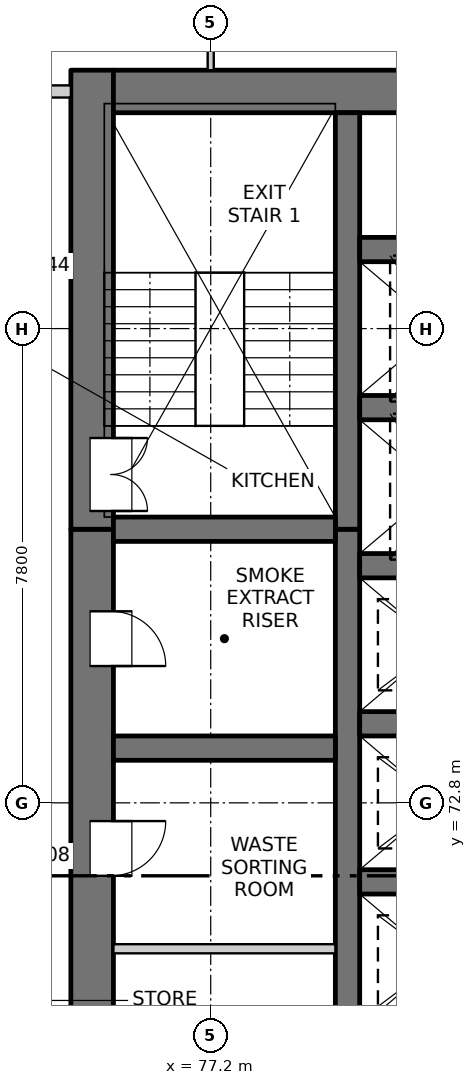
"""IFC4 building model, lengths in metres.
Left out: names, types, materials, properties, quantities, classifications, styles, units other than length and angle.
Written with IfcOpenShell. Run it as: python <this file> out.ifc"""

import sys

from ifc_helpers import new_model, si_unit, direction, frame, frame_2d, origin, place, context, subcontext, project, spatial, rectangle, extrude, element, fill, save


model = new_model("IFC4")
c1 = context("Model", 3, precision=1e-05, world=origin(), true_north=direction((0.0, 1.0)))
c2 = subcontext(c1, "Body", "Model", "MODEL_VIEW")
j1 = project(units=[si_unit("LENGTHUNIT", "METRE"), si_unit("PLANEANGLEUNIT", "RADIAN")], contexts=[c1])
p1 = place(None, origin())
s1 = spatial("IfcSite", under=j1, at=p1, CompositionType="ELEMENT")
p2 = place(p1, origin())
s2 = spatial("IfcBuilding", under=s1, at=p2, CompositionType="ELEMENT")
p3 = place(p2, frame((0.0, 0.0, 39.9)))
s3 = spatial("IfcBuildingStorey", under=s2, at=p3, CompositionType="ELEMENT", Elevation=39.9)
p4 = place(p3, frame((75.25, 54.9, -0.25), z_axis=(0.0, 0.0, 1.0), x_axis=(0.0, 1.0, 0.0)))
e1 = element("IfcWall", 1, at=p4, inside=s3, PredefinedType="SOLIDWALL", context=c2, shape_type="SweptSolid", body=[
    extrude(rectangle(XDim=22.4, YDim=0.7, at=frame_2d((11.2, 0.0))), origin(), (0.0, 0.0, 1.0), 3.4),
])
p5 = place(p4, frame((7.55, 0.0, 0.25)))
e2 = element("IfcOpeningElement", 2, at=p5, cuts=e1, PredefinedType="OPENING", context=c2, shape_type="SweptSolid", body=[
    extrude(rectangle(XDim=0.9, YDim=2.1, at=frame_2d((0.45, 1.05))), frame((0.0, 0.36, 0.0), z_axis=(0.0, -1.0, 0.0), x_axis=(1.0, 0.0, 0.0)), (0.0, 0.0, 1.0), 0.72),
])
p6 = place(p4, frame((12.2, 0.0, 0.25)))
e3 = element("IfcOpeningElement", 3, at=p6, cuts=e1, PredefinedType="OPENING", context=c2, shape_type="SweptSolid", body=[
    extrude(rectangle(XDim=0.9, YDim=2.1, at=frame_2d((0.45, 1.05))), frame((0.0, 0.36, 0.0), z_axis=(0.0, -1.0, 0.0), x_axis=(1.0, 0.0, 0.0)), (0.0, 0.0, 1.0), 0.72),
])
p7 = place(p4, frame((16.7, 0.0, 0.25)))
e4 = element("IfcOpeningElement", 4, at=p7, cuts=e1, PredefinedType="OPENING", context=c2, shape_type="SweptSolid", body=[
    extrude(rectangle(XDim=0.9, YDim=2.1, at=frame_2d((0.45, 1.05))), frame((0.0, 0.36, 0.0), z_axis=(0.0, -1.0, 0.0), x_axis=(1.0, 0.0, 0.0)), (0.0, 0.0, 1.0), 0.72),
])
p8 = place(p4, frame((20.15, 0.0, 0.25)))
e5 = element("IfcOpeningElement", 5, at=p8, cuts=e1, PredefinedType="OPENING", context=c2, shape_type="SweptSolid", body=[
    extrude(rectangle(XDim=0.9, YDim=2.1, at=frame_2d((0.45, 1.05))), frame((0.0, 0.36, 0.0), z_axis=(0.0, -1.0, 0.0), x_axis=(1.0, 0.0, 0.0)), (0.0, 0.0, 1.0), 0.72),
])
p9 = place(p3, frame((75.25, 77.3, -0.25), z_axis=(0.0, 0.0, 1.0), x_axis=(0.0, 1.0, 0.0)))
e6 = element("IfcWall", 6, at=p9, inside=s3, PredefinedType="SOLIDWALL", context=c2, shape_type="SweptSolid", body=[
    extrude(rectangle(XDim=7.55, YDim=0.7, at=frame_2d((3.775, 0.0))), origin(), (0.0, 0.0, 1.0), 3.4),
])
p10 = place(p9, frame((0.3, 0.0, 0.25)))
e7 = element("IfcOpeningElement", 7, at=p10, cuts=e6, PredefinedType="OPENING", context=c2, shape_type="SweptSolid", body=[
    extrude(rectangle(XDim=1.2, YDim=2.1, at=frame_2d((0.6, 1.05))), frame((0.0, 0.36, 0.0), z_axis=(0.0, -1.0, 0.0), x_axis=(1.0, 0.0, 0.0)), (0.0, 0.0, 1.0), 0.72),
])
p11 = place(p3, frame((75.6, 84.5, -0.25), z_axis=(0.0, 0.0, 1.0), x_axis=(1.0, 0.0, 0.0)))
e8 = element("IfcWall", 8, at=p11, inside=s3, PredefinedType="SOLIDWALL", context=c2, shape_type="SweptSolid", body=[
    extrude(rectangle(XDim=18.8, YDim=0.7, at=frame_2d((9.4, 0.0))), origin(), (0.0, 0.0, 1.0), 3.4),
])
p12 = place(p3, frame((79.45, 60.9, -0.25), z_axis=(0.0, 0.0, 1.0), x_axis=(0.0, 1.0, 0.0)))
e9 = element("IfcWall", 9, at=p12, inside=s3, PredefinedType="SOLIDWALL", context=c2, shape_type="SweptSolid", body=[
    extrude(rectangle(XDim=16.4, YDim=0.4, at=frame_2d((8.2, 0.0))), origin(), (0.0, 0.0, 1.0), 3.4),
])
p13 = place(p3, frame((79.45, 77.3, -0.25), z_axis=(0.0, 0.0, 1.0), x_axis=(0.0, 1.0, 0.0)))
e10 = element("IfcWall", 10, at=p13, inside=s3, PredefinedType="SOLIDWALL", context=c2, shape_type="SweptSolid", body=[
    extrude(rectangle(XDim=6.85, YDim=0.4, at=frame_2d((3.425, 0.0))), origin(), (0.0, 0.0, 1.0), 3.4),
])
for number, where, z_axis, x_axis in (
    (11, (79.65, 71.5, -0.25), (0.0, 0.0, 1.0), (1.0, 0.0, 0.0)),
    (12, (79.65, 74.1, -0.25), (0.0, 0.0, 1.0), (1.0, 0.0, 0.0)),
    (13, (79.65, 76.7, -0.25), (0.0, 0.0, 1.0), (1.0, 0.0, 0.0)),
    (14, (79.65, 79.3, -0.25), (0.0, 0.0, 1.0), (1.0, 0.0, 0.0)),
    (15, (79.65, 81.9, -0.25), (0.0, 0.0, 1.0), (1.0, 0.0, 0.0)),
):
    element("IfcWall", number, at=place(p3, frame(where, z_axis=z_axis, x_axis=x_axis)), inside=s3, PredefinedType="SOLIDWALL", context=c2, shape_type="SweptSolid", body=[
        extrude(rectangle(XDim=3.0, YDim=0.4, at=frame_2d((1.5, 0.0))), origin(), (0.0, 0.0, 1.0), 3.4),
    ])
for number, where, z_axis, x_axis in (
    (16, (75.6, 73.7, -0.25), (0.0, 0.0, 1.0), (1.0, 0.0, 0.0)),
    (17, (75.6, 77.3, -0.25), (0.0, 0.0, 1.0), (1.0, 0.0, 0.0)),
):
    element("IfcWall", number, at=place(p3, frame(where, z_axis=z_axis, x_axis=x_axis)), inside=s3, PredefinedType="SOLIDWALL", context=c2, shape_type="SweptSolid", body=[
        extrude(rectangle(XDim=3.65, YDim=0.4, at=frame_2d((1.825, 0.0))), origin(), (0.0, 0.0, 1.0), 3.4),
    ])
p14 = place(p3, frame((75.6, 70.4, 0.0), z_axis=(0.0, 0.0, 1.0), x_axis=(1.0, 0.0, 0.0)))
e18 = element("IfcWall", 18, at=p14, inside=s3, PredefinedType="PARTITIONING", context=c2, shape_type="SweptSolid", body=[
    extrude(rectangle(XDim=3.65, YDim=0.15, at=frame_2d((1.825, 0.0))), origin(), (0.0, 0.0, 1.0), 3.15),
])
p15 = place(p3, frame((73.2, 84.5, 0.0), z_axis=(0.0, 0.0, 1.0), x_axis=(1.0, 0.0, 0.0)))
e19 = element("IfcWall", 19, at=p15, inside=s3, PredefinedType="PARTITIONING", context=c2, shape_type="SweptSolid", body=[
    extrude(rectangle(XDim=1.7, YDim=0.2, at=frame_2d((0.85, 0.0))), origin(), (0.0, 0.0, 1.0), 3.15),
])
p16 = place(p3, frame((77.2, 84.85, 0.0), z_axis=(0.0, 0.0, 1.0), x_axis=(0.0, 1.0, 0.0)))
e20 = element("IfcWall", 20, at=p16, inside=s3, PredefinedType="PARTITIONING", context=c2, shape_type="SweptSolid", body=[
    extrude(rectangle(XDim=3.25, YDim=0.1, at=frame_2d((1.625, 0.0))), origin(), (0.0, 0.0, 1.0), 3.15),
])
p17 = place(p16, frame((1.15, 0.0, 0.0)))
e21 = element("IfcOpeningElement", 21, at=p17, cuts=e20, PredefinedType="OPENING", context=c2, shape_type="SweptSolid", body=[
    extrude(rectangle(XDim=0.9, YDim=2.1, at=frame_2d((0.45, 1.05))), frame((0.0, 0.06, 0.0), z_axis=(0.0, -1.0, 0.0), x_axis=(1.0, 0.0, 0.0)), (0.0, 0.0, 1.0), 0.12),
])
p18 = place(p7, origin())
e22 = element("IfcDoor", 22, at=p18, inside=s3, OperationType="SINGLE_SWING_LEFT", PredefinedType="DOOR", context=c2, shape_type="SweptSolid", body=[
    extrude(rectangle(XDim=0.9, YDim=2.1, at=frame_2d((0.45, 1.05))), frame((0.0, -0.285, 0.0), z_axis=(0.0, -1.0, 0.0), x_axis=(1.0, 0.0, 0.0)), (0.0, 0.0, 1.0), 0.05),
])
fill(e4, e22)
p19 = place(p8, origin())
e23 = element("IfcDoor", 23, at=p19, inside=s3, OperationType="SINGLE_SWING_RIGHT", PredefinedType="DOOR", context=c2, shape_type="SweptSolid", body=[
    extrude(rectangle(XDim=0.9, YDim=2.1, at=frame_2d((0.45, 1.05))), frame((0.0, -0.285, 0.0), z_axis=(0.0, -1.0, 0.0), x_axis=(1.0, 0.0, 0.0)), (0.0, 0.0, 1.0), 0.05),
])
fill(e5, e23)
p20 = place(p10, origin())
e24 = element("IfcDoor", 24, at=p20, inside=s3, OperationType="DOUBLE_DOOR_SINGLE_SWING", PredefinedType="DOOR", context=c2, shape_type="SweptSolid", body=[
    extrude(rectangle(XDim=1.2, YDim=2.1, at=frame_2d((0.6, 1.05))), frame((0.0, -0.285, 0.0), z_axis=(0.0, -1.0, 0.0), x_axis=(1.0, 0.0, 0.0)), (0.0, 0.0, 1.0), 0.05),
])
fill(e7, e24)
save(model, sys.argv[1])
